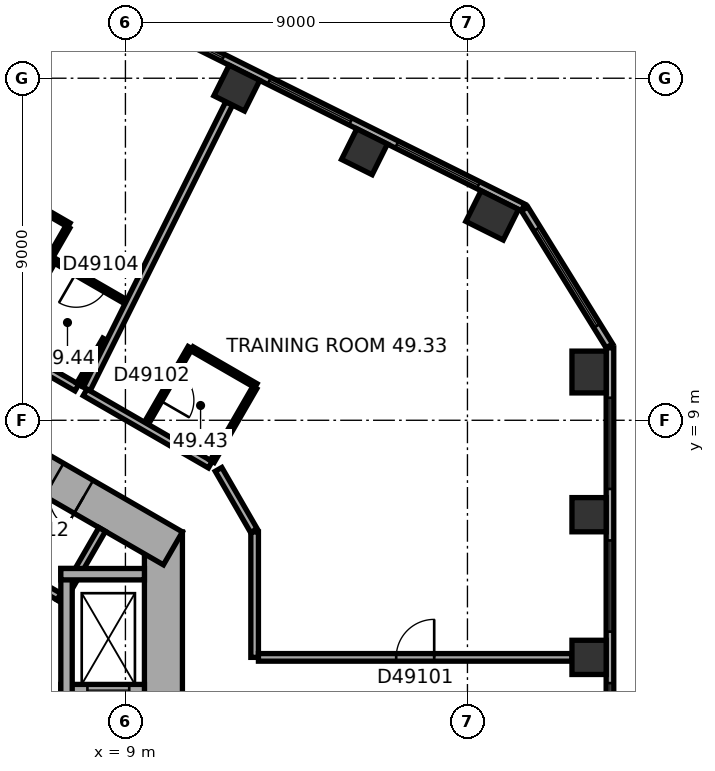
"""IFC4 building model, lengths in metres.
Left out: names, types, materials, properties, quantities, classifications, styles, units other than length and angle.
Written with IfcOpenShell. Run it as: python <this file> out.ifc"""

import sys

from ifc_helpers import new_model, si_unit, direction, frame, frame_2d, origin, origin_2d, place, context, subcontext, project, spatial, rectangle, extrude, element, fill, save


model = new_model("IFC4")
c1 = context("Model", 3, precision=1e-05, world=origin(), true_north=direction((0.0, 1.0)))
c2 = subcontext(c1, "Body", "Model", "MODEL_VIEW")
j1 = project(units=[si_unit("LENGTHUNIT", "METRE"), si_unit("PLANEANGLEUNIT", "RADIAN")], contexts=[c1])
p1 = place(None, origin())
s1 = spatial("IfcSite", under=j1, at=p1, CompositionType="ELEMENT")
p2 = place(p1, origin())
s2 = spatial("IfcBuilding", under=s1, at=p2, CompositionType="ELEMENT")
p3 = place(p2, frame((0.0, 0.0, 198.4)))
s3 = spatial("IfcBuildingStorey", under=s2, at=p3, CompositionType="ELEMENT", Elevation=198.4)
for number, where, z_axis, x_axis in (
    (1, (21.2, 2.761, 0.0), (0.0, 0.0, 1.0), (0.0, 1.0, 0.0)),
    (2, (21.2, 6.515, 0.0), (0.0, 0.0, 1.0), (0.0, 1.0, 0.0)),
):
    element("IfcColumn", number, at=place(p3, frame(where, z_axis=z_axis, x_axis=x_axis)), inside=s3, PredefinedType="COLUMN", context=c2, shape_type="SweptSolid", body=[
        extrude(rectangle(XDim=0.9, YDim=0.9, at=origin_2d()), origin(), (0.0, 0.0, 1.0), 3.7),
    ])
for number, where, z_axis, x_axis in (
    (3, (21.2, 10.27, 0.0), (0.0, 0.0, 1.0), (0.0, 1.0, 0.0)),
    (4, (18.65, 14.39, 0.0), (0.0, 0.0, 1.0), (-0.895, 0.446, 0.0)),
):
    element("IfcColumn", number, at=place(p3, frame(where, z_axis=z_axis, x_axis=x_axis)), inside=s3, PredefinedType="COLUMN", context=c2, shape_type="SweptSolid", body=[
        extrude(rectangle(XDim=1.1, YDim=0.9, at=origin_2d()), origin(), (0.0, 0.0, 1.0), 3.7),
    ])
for number, where, z_axis, x_axis in (
    (5, (15.29, 16.065, 0.0), (0.0, 0.0, 1.0), (-0.895, 0.446, 0.0)),
    (6, (11.931, 17.74, 0.0), (0.0, 0.0, 1.0), (-0.895, 0.446, 0.0)),
):
    element("IfcColumn", number, at=place(p3, frame(where, z_axis=z_axis, x_axis=x_axis)), inside=s3, PredefinedType="COLUMN", context=c2, shape_type="SweptSolid", body=[
        extrude(rectangle(XDim=0.9, YDim=0.9, at=origin_2d()), origin(), (0.0, 0.0, 1.0), 3.7),
    ])
p4 = place(p3, frame((10.0, -6.062, 0.0), z_axis=(0.0, 0.0, 1.0), x_axis=(0.0, 1.0, 0.0)))
e7 = element("IfcWall", 7, at=p4, inside=s3, PredefinedType="SHEAR", context=c2, shape_type="SweptSolid", body=[
    extrude(rectangle(XDim=12.125, YDim=1.0, at=frame_2d((6.062, 0.0))), origin(), (0.0, 0.0, 1.0), 3.7),
])
p5 = place(p4, frame((6.262, 0.0, 0.0)))
e8 = element("IfcOpeningElement", 8, at=p5, cuts=e7, PredefinedType="OPENING", context=c2, shape_type="SweptSolid", body=[
    extrude(rectangle(XDim=1.5, YDim=2.1, at=frame_2d((0.75, 1.05))), frame((0.0, 0.51, 0.0), z_axis=(0.0, -1.0, 0.0), x_axis=(1.0, 0.0, 0.0)), (0.0, 0.0, 1.0), 1.02),
])
p6 = place(p4, frame((1.812, 0.0, 0.0)))
e9 = element("IfcOpeningElement", 9, at=p6, cuts=e7, PredefinedType="OPENING", context=c2, shape_type="SweptSolid", body=[
    extrude(rectangle(XDim=0.9, YDim=2.1, at=frame_2d((0.45, 1.05))), frame((0.0, 0.51, 0.0), z_axis=(0.0, -1.0, 0.0), x_axis=(1.0, 0.0, 0.0)), (0.0, 0.0, 1.0), 1.02),
])
p7 = place(p4, frame((4.412, 0.0, 0.0)))
e10 = element("IfcOpeningElement", 10, at=p7, cuts=e7, PredefinedType="OPENING", context=c2, shape_type="SweptSolid", body=[
    extrude(rectangle(XDim=0.9, YDim=2.1, at=frame_2d((0.45, 1.05))), frame((0.0, 0.51, 0.0), z_axis=(0.0, -1.0, 0.0), x_axis=(1.0, 0.0, 0.0)), (0.0, 0.0, 1.0), 1.02),
])
p8 = place(p3, frame((10.25, 5.629, 0.0), z_axis=(0.0, 0.0, 1.0), x_axis=(-0.866022616891, 0.50000482701, 0.0)))
e11 = element("IfcWall", 11, at=p8, inside=s3, PredefinedType="SHEAR", context=c2, shape_type="SweptSolid", body=[
    extrude(rectangle(XDim=12.125, YDim=1.0, at=frame_2d((6.062, 0.0))), origin(), (0.0, 0.0, 1.0), 3.7),
])
p9 = place(p8, frame((2.712, 0.0, 0.0)))
e12 = element("IfcOpeningElement", 12, at=p9, cuts=e11, PredefinedType="OPENING", context=c2, shape_type="SweptSolid", body=[
    extrude(rectangle(XDim=0.9, YDim=2.1, at=frame_2d((0.45, 1.05))), frame((0.0, 0.51, 0.0), z_axis=(0.0, -1.0, 0.0), x_axis=(1.0, 0.0, 0.0)), (0.0, 0.0, 1.0), 1.02),
])
p10 = place(p8, frame((6.612, 0.0, 0.0)))
e13 = element("IfcOpeningElement", 13, at=p10, cuts=e11, PredefinedType="OPENING", context=c2, shape_type="SweptSolid", body=[
    extrude(rectangle(XDim=0.9, YDim=2.1, at=frame_2d((0.45, 1.05))), frame((0.0, 0.51, 0.0), z_axis=(0.0, -1.0, 0.0), x_axis=(1.0, 0.0, 0.0)), (0.0, 0.0, 1.0), 1.02),
])
p11 = place(p3, frame((21.75, -9.138, 0.0), z_axis=(0.0, 0.0, 1.0), x_axis=(0.0, 1.0, 0.0)))
e14 = element("IfcWall", 14, at=p11, inside=s3, PredefinedType="STANDARD", context=c2, shape_type="SweptSolid", body=[
    extrude(rectangle(XDim=20.044, YDim=0.2, at=frame_2d((10.022, 0.0))), origin(), (0.0, 0.0, 1.0), 3.7),
])
p12 = place(p11, frame((1.314, 0.0, 0.9)))
e15 = element("IfcOpeningElement", 15, at=p12, cuts=e14, PredefinedType="OPENING", context=c2, shape_type="SweptSolid", body=[
    extrude(rectangle(XDim=2.4, YDim=2.0, at=frame_2d((1.2, 1.0))), frame((0.0, 0.11, 0.0), z_axis=(0.0, -1.0, 0.0), x_axis=(1.0, 0.0, 0.0)), (0.0, 0.0, 1.0), 0.22),
])
p13 = place(p11, frame((5.069, 0.0, 0.9)))
e16 = element("IfcOpeningElement", 16, at=p13, cuts=e14, PredefinedType="OPENING", context=c2, shape_type="SweptSolid", body=[
    extrude(rectangle(XDim=2.4, YDim=2.0, at=frame_2d((1.2, 1.0))), frame((0.0, 0.11, 0.0), z_axis=(0.0, -1.0, 0.0), x_axis=(1.0, 0.0, 0.0)), (0.0, 0.0, 1.0), 0.22),
])
p14 = place(p11, frame((8.823, 0.0, 0.9)))
e17 = element("IfcOpeningElement", 17, at=p14, cuts=e14, PredefinedType="OPENING", context=c2, shape_type="SweptSolid", body=[
    extrude(rectangle(XDim=2.4, YDim=2.0, at=frame_2d((1.2, 1.0))), frame((0.0, 0.11, 0.0), z_axis=(0.0, -1.0, 0.0), x_axis=(1.0, 0.0, 0.0)), (0.0, 0.0, 1.0), 0.22),
])
p15 = place(p11, frame((12.577, 0.0, 0.9)))
e18 = element("IfcOpeningElement", 18, at=p15, cuts=e14, PredefinedType="OPENING", context=c2, shape_type="SweptSolid", body=[
    extrude(rectangle(XDim=2.4, YDim=2.0, at=frame_2d((1.2, 1.0))), frame((0.0, 0.11, 0.0), z_axis=(0.0, -1.0, 0.0), x_axis=(1.0, 0.0, 0.0)), (0.0, 0.0, 1.0), 0.22),
])
p16 = place(p11, frame((16.331, 0.0, 0.9)))
e19 = element("IfcOpeningElement", 19, at=p16, cuts=e14, PredefinedType="OPENING", context=c2, shape_type="SweptSolid", body=[
    extrude(rectangle(XDim=2.4, YDim=2.0, at=frame_2d((1.2, 1.0))), frame((0.0, 0.11, 0.0), z_axis=(0.0, -1.0, 0.0), x_axis=(1.0, 0.0, 0.0)), (0.0, 0.0, 1.0), 0.22),
])
p17 = place(p3, frame((21.735, 10.958, 0.0), z_axis=(0.0, 0.0, 1.0), x_axis=(-0.526213807775, 0.850352296702, 0.0)))
e20 = element("IfcWall", 20, at=p17, inside=s3, PredefinedType="STANDARD", context=c2, shape_type="SweptSolid", body=[
    extrude(rectangle(XDim=4.238, YDim=0.2, at=frame_2d((2.119, 0.0))), origin(), (0.0, 0.0, 1.0), 3.7),
])
p18 = place(p17, frame((0.619, 0.0, 0.9)))
e21 = element("IfcOpeningElement", 21, at=p18, cuts=e20, PredefinedType="OPENING", context=c2, shape_type="SweptSolid", body=[
    extrude(rectangle(XDim=3.0, YDim=2.0, at=frame_2d((1.5, 1.0))), frame((0.0, 0.11, 0.0), z_axis=(0.0, -1.0, 0.0), x_axis=(1.0, 0.0, 0.0)), (0.0, 0.0, 1.0), 0.22),
])
p19 = place(p3, frame((19.464, 14.599, 0.0), z_axis=(0.0, 0.0, 1.0), x_axis=(-0.894935755043, 0.446195018289, 0.0)))
e22 = element("IfcWall", 22, at=p19, inside=s3, PredefinedType="STANDARD", context=c2, shape_type="SweptSolid", body=[
    extrude(rectangle(XDim=20.044, YDim=0.2, at=frame_2d((10.022, 0.0))), origin(), (0.0, 0.0, 1.0), 3.7),
])
p20 = place(p19, frame((1.313, 0.0, 0.9)))
e23 = element("IfcOpeningElement", 23, at=p20, cuts=e22, PredefinedType="OPENING", context=c2, shape_type="SweptSolid", body=[
    extrude(rectangle(XDim=2.4, YDim=2.0, at=frame_2d((1.2, 1.0))), frame((0.0, 0.11, 0.0), z_axis=(0.0, -1.0, 0.0), x_axis=(1.0, 0.0, 0.0)), (0.0, 0.0, 1.0), 0.22),
])
p21 = place(p19, frame((5.067, 0.0, 0.9)))
e24 = element("IfcOpeningElement", 24, at=p21, cuts=e22, PredefinedType="OPENING", context=c2, shape_type="SweptSolid", body=[
    extrude(rectangle(XDim=2.4, YDim=2.0, at=frame_2d((1.2, 1.0))), frame((0.0, 0.11, 0.0), z_axis=(0.0, -1.0, 0.0), x_axis=(1.0, 0.0, 0.0)), (0.0, 0.0, 1.0), 0.22),
])
p22 = place(p19, frame((8.821, 0.0, 0.9)))
e25 = element("IfcOpeningElement", 25, at=p22, cuts=e22, PredefinedType="OPENING", context=c2, shape_type="SweptSolid", body=[
    extrude(rectangle(XDim=2.4, YDim=2.0, at=frame_2d((1.2, 1.0))), frame((0.0, 0.11, 0.0), z_axis=(0.0, -1.0, 0.0), x_axis=(1.0, 0.0, 0.0)), (0.0, 0.0, 1.0), 0.22),
])
p23 = place(p19, frame((12.575, 0.0, 0.9)))
e26 = element("IfcOpeningElement", 26, at=p23, cuts=e22, PredefinedType="OPENING", context=c2, shape_type="SweptSolid", body=[
    extrude(rectangle(XDim=2.4, YDim=2.0, at=frame_2d((1.2, 1.0))), frame((0.0, 0.11, 0.0), z_axis=(0.0, -1.0, 0.0), x_axis=(1.0, 0.0, 0.0)), (0.0, 0.0, 1.0), 0.22),
])
p24 = place(p19, frame((16.329, 0.0, 0.9)))
e27 = element("IfcOpeningElement", 27, at=p24, cuts=e22, PredefinedType="OPENING", context=c2, shape_type="SweptSolid", body=[
    extrude(rectangle(XDim=2.4, YDim=2.0, at=frame_2d((1.2, 1.0))), frame((0.0, 0.11, 0.0), z_axis=(0.0, -1.0, 0.0), x_axis=(1.0, 0.0, 0.0)), (0.0, 0.0, 1.0), 0.22),
])
p25 = place(p3, frame((7.424, 4.259, 0.0), z_axis=(0.0, 0.0, 1.0), x_axis=(-0.866026010844, 0.49999894854, 0.0)))
e28 = element("IfcWall", 28, at=p25, inside=s3, PredefinedType="PARTITIONING", context=c2, shape_type="SweptSolid", body=[
    extrude(rectangle(XDim=8.0, YDim=0.2, at=frame_2d((4.0, 0.0))), origin(), (0.0, 0.0, 1.0), 3.42),
])
p26 = place(p3, frame((7.287, 4.222, 0.0), z_axis=(0.0, 0.0, 1.0), x_axis=(0.499946605688, 0.86605622881, 0.0)))
e29 = element("IfcWall", 29, at=p26, inside=s3, PredefinedType="PARTITIONING", context=c2, shape_type="SweptSolid", body=[
    extrude(rectangle(XDim=2.2, YDim=0.2, at=frame_2d((1.1, 0.0))), origin(), (0.0, 0.0, 1.0), 3.42),
])
p27 = place(p3, frame((7.3, 1.9, 0.0), z_axis=(0.0, 0.0, 1.0), x_axis=(1.0, 0.0, 0.0)))
e30 = element("IfcWall", 30, at=p27, inside=s3, PredefinedType="SHEAR", context=c2, shape_type="SweptSolid", body=[
    extrude(rectangle(XDim=2.2, YDim=0.3, at=frame_2d((1.1, 0.0))), origin(), (0.0, 0.0, 1.0), 3.42),
])
p28 = place(p27, frame((0.7, 0.0, 0.0)))
e31 = element("IfcOpeningElement", 31, at=p28, cuts=e30, PredefinedType="OPENING", context=c2, shape_type="SweptSolid", body=[
    extrude(rectangle(XDim=1.1, YDim=2.1, at=frame_2d((0.55, 1.05))), frame((0.0, 0.16, 0.0), z_axis=(0.0, -1.0, 0.0), x_axis=(1.0, 0.0, 0.0)), (0.0, 0.0, 1.0), 0.32),
])
p29 = place(p3, frame((7.45, 1.75, 0.0), z_axis=(0.0, 0.0, 1.0), x_axis=(0.0, 1.0, 0.0)))
e32 = element("IfcWall", 32, at=p29, inside=s3, PredefinedType="SHEAR", context=c2, shape_type="SweptSolid", body=[
    extrude(rectangle(XDim=3.35, YDim=0.3, at=frame_2d((1.675, 0.0))), origin(), (0.0, 0.0, 1.0), 3.42),
])
p30 = place(p3, frame((7.3, 4.95, 0.0), z_axis=(0.0, 0.0, 1.0), x_axis=(1.0, 0.0, 0.0)))
e33 = element("IfcWall", 33, at=p30, inside=s3, PredefinedType="SHEAR", context=c2, shape_type="SweptSolid", body=[
    extrude(rectangle(XDim=2.2, YDim=0.3, at=frame_2d((1.1, 0.0))), origin(), (0.0, 0.0, 1.0), 3.42),
])
p31 = place(p3, frame((4.621, 15.807, 0.0), z_axis=(0.0, 0.0, 1.0), x_axis=(0.866039519639, -0.499975549825, 0.0)))
e34 = element("IfcWall", 34, at=p31, inside=s3, PredefinedType="PARTITIONING", context=c2, shape_type="SweptSolid", body=[
    extrude(rectangle(XDim=3.34, YDim=0.12, at=frame_2d((1.67, 0.0))), origin(), (0.0, 0.0, 1.0), 3.42),
])
p32 = place(p3, frame((5.867, 11.046, 0.0), z_axis=(0.0, 0.0, 1.0), x_axis=(0.500004234368, 0.866022959057, 0.0)))
e35 = element("IfcWall", 35, at=p32, inside=s3, PredefinedType="PARTITIONING", context=c2, shape_type="SweptSolid", body=[
    extrude(rectangle(XDim=2.5, YDim=0.12, at=frame_2d((1.25, 0.0))), origin(), (0.0, 0.0, 1.0), 3.42),
])
p33 = place(p3, frame((7.169, 13.181, 0.0), z_axis=(0.0, 0.0, 1.0), x_axis=(0.866048165231, -0.499960573946, 0.0)))
e36 = element("IfcWall", 36, at=p33, inside=s3, PredefinedType="PARTITIONING", context=c2, shape_type="SweptSolid", body=[
    extrude(rectangle(XDim=2.13, YDim=0.12, at=frame_2d((1.065, 0.0))), origin(), (0.0, 0.0, 1.0), 3.42),
])
p34 = place(p33, frame((0.615, 0.0, 0.0)))
e37 = element("IfcOpeningElement", 37, at=p34, cuts=e36, PredefinedType="OPENING", context=c2, shape_type="SweptSolid", body=[
    extrude(rectangle(XDim=0.9, YDim=2.1, at=frame_2d((0.45, 1.05))), frame((0.0, 0.07, 0.0), z_axis=(0.0, -1.0, 0.0), x_axis=(1.0, 0.0, 0.0)), (0.0, 0.0, 1.0), 0.14),
])
p35 = place(p3, frame((7.483, 14.085, 0.0), z_axis=(0.0, 0.0, 1.0), x_axis=(-0.499978425106, -0.866037859697, 0.0)))
e38 = element("IfcWall", 38, at=p35, inside=s3, PredefinedType="PARTITIONING", context=c2, shape_type="SweptSolid", body=[
    extrude(rectangle(XDim=3.44, YDim=0.12, at=frame_2d((1.72, 0.0))), origin(), (0.0, 0.0, 1.0), 3.42),
])
p36 = place(p3, frame((7.722, 9.86, 0.0), z_axis=(0.0, 0.0, 1.0), x_axis=(-0.86598042715, 0.500077893725, 0.0)))
e39 = element("IfcWall", 39, at=p36, inside=s3, PredefinedType="PARTITIONING", context=c2, shape_type="SweptSolid", body=[
    extrude(rectangle(XDim=2.2, YDim=0.2, at=frame_2d((1.1, 0.0))), origin(), (0.0, 0.0, 1.0), 3.42),
])
p37 = place(p3, frame((8.457, 11.132, 0.0), z_axis=(0.0, 0.0, 1.0), x_axis=(-0.500129009956, -0.865950907038, 0.0)))
e40 = element("IfcWall", 40, at=p37, inside=s3, PredefinedType="PARTITIONING", context=c2, shape_type="SweptSolid", body=[
    extrude(rectangle(XDim=1.369, YDim=0.12, at=frame_2d((0.685, 0.0))), origin(), (0.0, 0.0, 1.0), 3.42),
])
p38 = place(p3, frame((9.552, 8.919, 0.0), z_axis=(0.0, 0.0, 1.0), x_axis=(0.499952165731, 0.866053019151, 0.0)))
e41 = element("IfcWall", 41, at=p38, inside=s3, PredefinedType="PARTITIONING", context=c2, shape_type="SweptSolid", body=[
    extrude(rectangle(XDim=2.3, YDim=0.12, at=frame_2d((1.15, 0.0))), origin(), (0.0, 0.0, 1.0), 3.42),
])
p39 = place(p38, frame((0.7, 0.0, 0.0)))
e42 = element("IfcOpeningElement", 42, at=p39, cuts=e41, PredefinedType="OPENING", context=c2, shape_type="SweptSolid", body=[
    extrude(rectangle(XDim=0.9, YDim=2.1, at=frame_2d((0.45, 1.05))), frame((0.0, 0.07, 0.0), z_axis=(0.0, -1.0, 0.0), x_axis=(1.0, 0.0, 0.0)), (0.0, 0.0, 1.0), 0.14),
])
p40 = place(p3, frame((10.753, 10.881, 0.0), z_axis=(0.0, 0.0, 1.0), x_axis=(0.866043088465, -0.499969367985, 0.0)))
e43 = element("IfcWall", 43, at=p40, inside=s3, PredefinedType="PARTITIONING", context=c2, shape_type="SweptSolid", body=[
    extrude(rectangle(XDim=1.94, YDim=0.12, at=frame_2d((0.97, 0.0))), origin(), (0.0, 0.0, 1.0), 3.42),
])
p41 = place(p3, frame((11.233, 7.833, 0.0), z_axis=(0.0, 0.0, 1.0), x_axis=(-0.866002813504, 0.500039125473, 0.0)))
e44 = element("IfcWall", 44, at=p41, inside=s3, PredefinedType="PARTITIONING", context=c2, shape_type="SweptSolid", body=[
    extrude(rectangle(XDim=3.804, YDim=0.2, at=frame_2d((1.902, 0.0))), origin(), (0.0, 0.0, 1.0), 3.42),
])
p42 = place(p3, frame((11.73, 17.338, 0.0), z_axis=(0.0, 0.0, 1.0), x_axis=(-0.446189718314, -0.894938397473, 0.0)))
e45 = element("IfcWall", 45, at=p42, inside=s3, PredefinedType="PARTITIONING", context=c2, shape_type="SweptSolid", body=[
    extrude(rectangle(XDim=8.396, YDim=0.2, at=frame_2d((4.198, 0.0))), origin(), (0.0, 0.0, 1.0), 2.87),
])
p43 = place(p3, frame((12.38, 6.097, 0.0), z_axis=(0.0, 0.0, 1.0), x_axis=(-0.499964847546, 0.866045698112, 0.0)))
e46 = element("IfcWall", 46, at=p43, inside=s3, PredefinedType="PARTITIONING", context=c2, shape_type="SweptSolid", body=[
    extrude(rectangle(XDim=1.86, YDim=0.2, at=frame_2d((0.93, 0.0))), origin(), (0.0, 0.0, 1.0), 3.42),
])
p44 = place(p3, frame((12.4, 2.761, 0.0), z_axis=(0.0, 0.0, 1.0), x_axis=(0.0, 1.0, 0.0)))
e47 = element("IfcWall", 47, at=p44, inside=s3, PredefinedType="PARTITIONING", context=c2, shape_type="SweptSolid", body=[
    extrude(rectangle(XDim=3.301, YDim=0.2, at=frame_2d((1.65, 0.0))), origin(), (0.0, 0.0, 1.0), 3.42),
])
p45 = place(p3, frame((12.404, 9.859, 0.0), z_axis=(0.0, 0.0, 1.0), x_axis=(-0.500030632641, -0.866007717299, 0.0)))
e48 = element("IfcWall", 48, at=p45, inside=s3, PredefinedType="PARTITIONING", context=c2, shape_type="SweptSolid", body=[
    extrude(rectangle(XDim=2.24, YDim=0.12, at=frame_2d((1.12, 0.0))), origin(), (0.0, 0.0, 1.0), 3.42),
])
p46 = place(p3, frame((20.75, 2.761, 0.0), z_axis=(0.0, 0.0, 1.0), x_axis=(-1.0, 0.0, 0.0)))
e49 = element("IfcWall", 49, at=p46, inside=s3, PredefinedType="PARTITIONING", context=c2, shape_type="SweptSolid", body=[
    extrude(rectangle(XDim=8.25, YDim=0.2, at=frame_2d((4.125, 0.0))), origin(), (0.0, 0.0, 1.0), 3.42),
])
p47 = place(p46, frame((3.625, 0.0, 0.0)))
e50 = element("IfcOpeningElement", 50, at=p47, cuts=e49, PredefinedType="OPENING", context=c2, shape_type="SweptSolid", body=[
    extrude(rectangle(XDim=1.0, YDim=2.1, at=frame_2d((0.5, 1.05))), frame((0.0, 0.11, 0.0), z_axis=(0.0, -1.0, 0.0), x_axis=(1.0, 0.0, 0.0)), (0.0, 0.0, 1.0), 0.22),
])
p48 = place(p14, origin())
e51 = element("IfcWindow", 51, at=p48, inside=s3, PartitioningType="SINGLE_PANEL", PredefinedType="WINDOW", context=c2, shape_type="SweptSolid", body=[
    extrude(rectangle(XDim=2.4, YDim=2.0, at=frame_2d((1.2, 1.0))), frame((0.0, 0.03, 0.0), z_axis=(0.0, -1.0, 0.0), x_axis=(1.0, 0.0, 0.0)), (0.0, 0.0, 1.0), 0.06),
])
fill(e17, e51)
p49 = place(p15, origin())
e52 = element("IfcWindow", 52, at=p49, inside=s3, PartitioningType="SINGLE_PANEL", PredefinedType="WINDOW", context=c2, shape_type="SweptSolid", body=[
    extrude(rectangle(XDim=2.4, YDim=2.0, at=frame_2d((1.2, 1.0))), frame((0.0, 0.03, 0.0), z_axis=(0.0, -1.0, 0.0), x_axis=(1.0, 0.0, 0.0)), (0.0, 0.0, 1.0), 0.06),
])
fill(e18, e52)
p50 = place(p16, origin())
e53 = element("IfcWindow", 53, at=p50, inside=s3, PartitioningType="SINGLE_PANEL", PredefinedType="WINDOW", context=c2, shape_type="SweptSolid", body=[
    extrude(rectangle(XDim=2.4, YDim=2.0, at=frame_2d((1.2, 1.0))), frame((0.0, 0.03, 0.0), z_axis=(0.0, -1.0, 0.0), x_axis=(1.0, 0.0, 0.0)), (0.0, 0.0, 1.0), 0.06),
])
fill(e19, e53)
p51 = place(p18, origin())
e54 = element("IfcWindow", 54, at=p51, inside=s3, PartitioningType="SINGLE_PANEL", PredefinedType="WINDOW", context=c2, shape_type="SweptSolid", body=[
    extrude(rectangle(XDim=3.0, YDim=2.0, at=frame_2d((1.5, 1.0))), frame((0.0, 0.03, 0.0), z_axis=(0.0, -1.0, 0.0), x_axis=(1.0, 0.0, 0.0)), (0.0, 0.0, 1.0), 0.06),
])
fill(e21, e54)
p52 = place(p20, origin())
e55 = element("IfcWindow", 55, at=p52, inside=s3, PartitioningType="SINGLE_PANEL", PredefinedType="WINDOW", context=c2, shape_type="SweptSolid", body=[
    extrude(rectangle(XDim=2.4, YDim=2.0, at=frame_2d((1.2, 1.0))), frame((0.0, 0.03, 0.0), z_axis=(0.0, -1.0, 0.0), x_axis=(1.0, 0.0, 0.0)), (0.0, 0.0, 1.0), 0.06),
])
fill(e23, e55)
p53 = place(p21, origin())
e56 = element("IfcWindow", 56, at=p53, inside=s3, PartitioningType="SINGLE_PANEL", PredefinedType="WINDOW", context=c2, shape_type="SweptSolid", body=[
    extrude(rectangle(XDim=2.4, YDim=2.0, at=frame_2d((1.2, 1.0))), frame((0.0, 0.03, 0.0), z_axis=(0.0, -1.0, 0.0), x_axis=(1.0, 0.0, 0.0)), (0.0, 0.0, 1.0), 0.06),
])
fill(e24, e56)
p54 = place(p22, origin())
e57 = element("IfcWindow", 57, at=p54, inside=s3, PartitioningType="SINGLE_PANEL", PredefinedType="WINDOW", context=c2, shape_type="SweptSolid", body=[
    extrude(rectangle(XDim=2.4, YDim=2.0, at=frame_2d((1.2, 1.0))), frame((0.0, 0.03, 0.0), z_axis=(0.0, -1.0, 0.0), x_axis=(1.0, 0.0, 0.0)), (0.0, 0.0, 1.0), 0.06),
])
fill(e25, e57)
p55 = place(p9, origin())
e58 = element("IfcDoor", 58, at=p55, inside=s3, OperationType="SINGLE_SWING_LEFT", PredefinedType="DOOR", context=c2, shape_type="SweptSolid", body=[
    extrude(rectangle(XDim=0.9, YDim=2.1, at=frame_2d((0.45, 1.05))), frame((0.0, 0.025, 0.0), z_axis=(0.0, -1.0, 0.0), x_axis=(1.0, 0.0, 0.0)), (0.0, 0.0, 1.0), 0.05),
])
fill(e12, e58)
p56 = place(p28, origin())
e59 = element("IfcDoor", 59, at=p56, inside=s3, OperationType="DOUBLE_DOOR_SLIDING", PredefinedType="DOOR", context=c2, shape_type="SweptSolid", body=[
    extrude(rectangle(XDim=1.1, YDim=2.1, at=frame_2d((0.55, 1.05))), frame((0.0, 0.025, 0.0), z_axis=(0.0, -1.0, 0.0), x_axis=(1.0, 0.0, 0.0)), (0.0, 0.0, 1.0), 0.05),
])
fill(e31, e59)
p57 = place(p47, origin())
e60 = element("IfcDoor", 60, at=p57, inside=s3, OperationType="SINGLE_SWING_LEFT", PredefinedType="DOOR", context=c2, shape_type="SweptSolid", body=[
    extrude(rectangle(XDim=1.0, YDim=2.1, at=frame_2d((0.5, 1.05))), frame((0.0, 0.025, 0.0), z_axis=(0.0, -1.0, 0.0), x_axis=(1.0, 0.0, 0.0)), (0.0, 0.0, 1.0), 0.05),
])
fill(e50, e60)
p58 = place(p39, origin())
e61 = element("IfcDoor", 61, at=p58, inside=s3, OperationType="SINGLE_SWING_LEFT", PredefinedType="DOOR", context=c2, shape_type="SweptSolid", body=[
    extrude(rectangle(XDim=0.9, YDim=2.1, at=frame_2d((0.45, 1.05))), frame((0.0, 0.025, 0.0), z_axis=(0.0, -1.0, 0.0), x_axis=(1.0, 0.0, 0.0)), (0.0, 0.0, 1.0), 0.05),
])
fill(e42, e61)
p59 = place(p34, origin())
e62 = element("IfcDoor", 62, at=p59, inside=s3, OperationType="SINGLE_SWING_LEFT", PredefinedType="DOOR", context=c2, shape_type="SweptSolid", body=[
    extrude(rectangle(XDim=0.9, YDim=2.1, at=frame_2d((0.45, 1.05))), frame((0.0, 0.025, 0.0), z_axis=(0.0, -1.0, 0.0), x_axis=(1.0, 0.0, 0.0)), (0.0, 0.0, 1.0), 0.05),
])
fill(e37, e62)
save(model, sys.argv[1])
